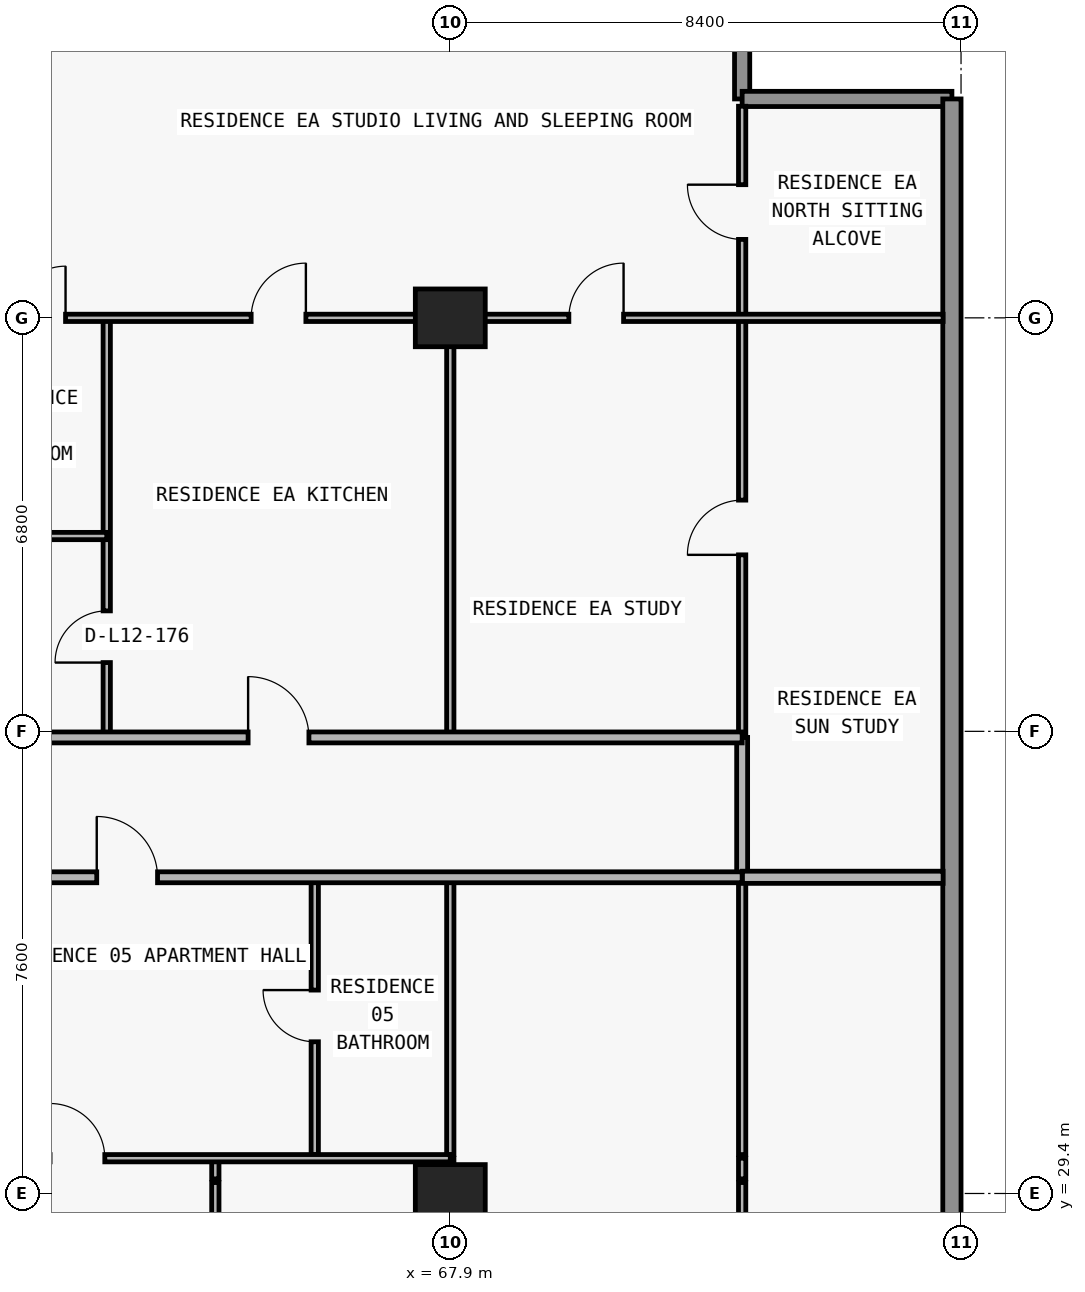
"""IFC4 building model, lengths in metres.
Left out: names, types, materials, properties, quantities, classifications, styles, units other than length and angle.
Written with IfcOpenShell. Run it as: python <this file> out.ifc"""

import sys

from ifc_helpers import new_model, si_unit, direction, frame, frame_2d, origin, origin_2d, place, context, subcontext, project, spatial, rectangle, extrude, element, fill, save


model = new_model("IFC4")
c1 = context("Model", 3, precision=1e-05, world=origin(), true_north=direction((0.0, 1.0)))
c2 = subcontext(c1, "Body", "Model", "MODEL_VIEW")
j1 = project(units=[si_unit("LENGTHUNIT", "METRE"), si_unit("PLANEANGLEUNIT", "RADIAN")], contexts=[c1])
p1 = place(None, origin())
s1 = spatial("IfcSite", under=j1, at=p1, CompositionType="ELEMENT")
p2 = place(p1, origin())
s2 = spatial("IfcBuilding", under=s1, at=p2, CompositionType="ELEMENT")
p3 = place(p2, frame((0.0, 0.0, 49.8)))
s3 = spatial("IfcBuildingStorey", under=s2, at=p3, CompositionType="ELEMENT", Elevation=49.8)
for number, where, z_axis, x_axis in (
    (1, (67.9, 29.4, 0.0), (0.0, 0.0, 1.0), (1.0, 0.0, 0.0)),
    (2, (67.9, 43.8, 0.0), (0.0, 0.0, 1.0), (1.0, 0.0, 0.0)),
):
    element("IfcColumn", number, at=place(p3, frame(where, z_axis=z_axis, x_axis=x_axis)), inside=s3, PredefinedType="COLUMN", context=c2, shape_type="SweptSolid", body=[
        extrude(rectangle(XDim=1.15, YDim=0.95, at=origin_2d()), origin(), (0.0, 0.0, 1.0), 3.05),
    ])
p4 = place(p3, frame((72.7, 50.45, 0.0), z_axis=(0.0, 0.0, 1.0), x_axis=(0.0, -1.0, 0.0)))
e3 = element("IfcWall", 3, at=p4, inside=s3, PredefinedType="ELEMENTEDWALL", context=c2, shape_type="SweptSolid", body=[
    extrude(rectangle(XDim=3.05, YDim=0.25, at=frame_2d((1.525, 0.0))), origin(), (0.0, 0.0, 1.0), 3.05),
])
p5 = place(p3, frame((72.7, 47.4, 0.0), z_axis=(0.0, 0.0, 1.0), x_axis=(1.0, 0.0, 0.0)))
e4 = element("IfcWall", 4, at=p5, inside=s3, PredefinedType="ELEMENTEDWALL", context=c2, shape_type="SweptSolid", body=[
    extrude(rectangle(XDim=3.45, YDim=0.25, at=frame_2d((1.725, 0.0))), origin(), (0.0, 0.0, 1.0), 3.05),
])
p6 = place(p3, frame((76.15, 47.4, 0.0), z_axis=(0.0, 0.0, 1.0), x_axis=(0.0, -1.0, 0.0)))
e5 = element("IfcWall", 5, at=p6, inside=s3, PredefinedType="STANDARD", context=c2, shape_type="SweptSolid", body=[
    extrude(rectangle(XDim=20.6, YDim=0.3, at=frame_2d((10.3, 0.0))), origin(), (0.0, 0.0, 1.0), 3.05),
])
p7 = place(p3, frame((62.25, 36.9, 0.0), z_axis=(0.0, 0.0, 1.0), x_axis=(0.0, 1.0, 0.0)))
e6 = element("IfcWall", 6, at=p7, inside=s3, PredefinedType="PARTITIONING", context=c2, shape_type="SweptSolid", body=[
    extrude(rectangle(XDim=6.9, YDim=0.12, at=frame_2d((3.45, 0.0))), origin(), (0.0, 0.0, 1.0), 2.486),
])
p8 = place(p7, frame((1.231, 0.0, 0.0)))
e7 = element("IfcOpeningElement", 7, at=p8, cuts=e6, PredefinedType="OPENING", context=c2, shape_type="SweptSolid", body=[
    extrude(rectangle(XDim=0.85, YDim=2.1, at=frame_2d((0.425, 1.05))), frame((0.0, 0.07, 0.0), z_axis=(0.0, -1.0, 0.0), x_axis=(1.0, 0.0, 0.0)), (0.0, 0.0, 1.0), 0.14),
])
p9 = place(p3, frame((64.036, 24.89, 0.0), z_axis=(0.0, 0.0, 1.0), x_axis=(0.0, 1.0, 0.0)))
e8 = element("IfcWall", 8, at=p9, inside=s3, PredefinedType="PARTITIONING", context=c2, shape_type="SweptSolid", body=[
    extrude(rectangle(XDim=4.69, YDim=0.12, at=frame_2d((2.345, 0.0))), origin(), (0.0, 0.0, 1.0), 3.05),
])
p10 = place(p9, frame((1.895, 0.0, 0.0)))
e9 = element("IfcOpeningElement", 9, at=p10, cuts=e8, PredefinedType="OPENING", context=c2, shape_type="SweptSolid", body=[
    extrude(rectangle(XDim=0.9, YDim=2.15, at=frame_2d((0.45, 1.075))), frame((0.0, 0.07, 0.0), z_axis=(0.0, -1.0, 0.0), x_axis=(1.0, 0.0, 0.0)), (0.0, 0.0, 1.0), 0.14),
])
p11 = place(p3, frame((64.036, 29.64, 0.0), z_axis=(0.0, 0.0, 1.0), x_axis=(0.0, 1.0, 0.0)))
e10 = element("IfcWall", 10, at=p11, inside=s3, PredefinedType="PARTITIONING", context=c2, shape_type="SweptSolid", body=[
    extrude(rectangle(XDim=0.34, YDim=0.12, at=frame_2d((0.17, 0.0))), origin(), (0.0, 0.0, 1.0), 3.05),
])
p12 = place(p3, frame((65.671, 30.04, 0.0), z_axis=(0.0, 0.0, 1.0), x_axis=(0.0, 1.0, 0.0)))
e11 = element("IfcWall", 11, at=p12, inside=s3, PredefinedType="PARTITIONING", context=c2, shape_type="SweptSolid", body=[
    extrude(rectangle(XDim=4.56, YDim=0.12, at=frame_2d((2.28, 0.0))), origin(), (0.0, 0.0, 1.0), 3.05),
])
p13 = place(p12, frame((1.855, 0.0, 0.0)))
e12 = element("IfcOpeningElement", 12, at=p13, cuts=e11, PredefinedType="OPENING", context=c2, shape_type="SweptSolid", body=[
    extrude(rectangle(XDim=0.85, YDim=2.1, at=frame_2d((0.425, 1.05))), frame((0.0, 0.07, 0.0), z_axis=(0.0, -1.0, 0.0), x_axis=(1.0, 0.0, 0.0)), (0.0, 0.0, 1.0), 0.14),
])
p14 = place(p3, frame((67.9, 24.89, 0.0), z_axis=(0.0, 0.0, 1.0), x_axis=(0.0, 1.0, 0.0)))
e13 = element("IfcWall", 13, at=p14, inside=s3, PredefinedType="PARTITIONING", context=c2, shape_type="SweptSolid", body=[
    extrude(rectangle(XDim=4.69, YDim=0.12, at=frame_2d((2.345, 0.0))), origin(), (0.0, 0.0, 1.0), 2.11),
])
p15 = place(p14, frame((1.895, 0.0, 0.0)))
e14 = element("IfcOpeningElement", 14, at=p15, cuts=e13, PredefinedType="OPENING", context=c2, shape_type="SweptSolid", body=[
    extrude(rectangle(XDim=0.9, YDim=2.06, at=frame_2d((0.45, 1.03))), frame((0.0, 0.07, 0.0), z_axis=(0.0, -1.0, 0.0), x_axis=(1.0, 0.0, 0.0)), (0.0, 0.0, 1.0), 0.14),
])
p16 = place(p3, frame((67.9, 29.64, 0.0), z_axis=(0.0, 0.0, 1.0), x_axis=(0.0, 1.0, 0.0)))
e15 = element("IfcWall", 15, at=p16, inside=s3, PredefinedType="PARTITIONING", context=c2, shape_type="SweptSolid", body=[
    extrude(rectangle(XDim=0.34, YDim=0.12, at=frame_2d((0.17, 0.0))), origin(), (0.0, 0.0, 1.0), 2.11),
])
p17 = place(p3, frame((67.9, 30.04, 0.0), z_axis=(0.0, 0.0, 1.0), x_axis=(0.0, 1.0, 0.0)))
e16 = element("IfcWall", 16, at=p17, inside=s3, PredefinedType="PARTITIONING", context=c2, shape_type="SweptSolid", body=[
    extrude(rectangle(XDim=4.56, YDim=0.12, at=frame_2d((2.28, 0.0))), origin(), (0.0, 0.0, 1.0), 2.11),
])
p18 = place(p3, frame((67.9, 36.9, 0.0), z_axis=(0.0, 0.0, 1.0), x_axis=(0.0, 1.0, 0.0)))
e17 = element("IfcWall", 17, at=p18, inside=s3, PredefinedType="PARTITIONING", context=c2, shape_type="SweptSolid", body=[
    extrude(rectangle(XDim=6.9, YDim=0.12, at=frame_2d((3.45, 0.0))), origin(), (0.0, 0.0, 1.0), 2.11),
])
p19 = place(p3, frame((72.7, 24.89, 0.0), z_axis=(0.0, 0.0, 1.0), x_axis=(0.0, 1.0, 0.0)))
e18 = element("IfcWall", 18, at=p19, inside=s3, PredefinedType="PARTITIONING", context=c2, shape_type="SweptSolid", body=[
    extrude(rectangle(XDim=4.69, YDim=0.12, at=frame_2d((2.345, 0.0))), origin(), (0.0, 0.0, 1.0), 3.05),
])
p20 = place(p3, frame((72.7, 29.64, 0.0), z_axis=(0.0, 0.0, 1.0), x_axis=(0.0, 1.0, 0.0)))
e19 = element("IfcWall", 19, at=p20, inside=s3, PredefinedType="PARTITIONING", context=c2, shape_type="SweptSolid", body=[
    extrude(rectangle(XDim=0.34, YDim=0.12, at=frame_2d((0.17, 0.0))), origin(), (0.0, 0.0, 1.0), 3.05),
])
p21 = place(p3, frame((72.7, 30.04, 0.0), z_axis=(0.0, 0.0, 1.0), x_axis=(0.0, 1.0, 0.0)))
e20 = element("IfcWall", 20, at=p21, inside=s3, PredefinedType="PARTITIONING", context=c2, shape_type="SweptSolid", body=[
    extrude(rectangle(XDim=4.56, YDim=0.12, at=frame_2d((2.28, 0.0))), origin(), (0.0, 0.0, 1.0), 3.05),
])
p22 = place(p3, frame((72.7, 34.605, 0.0), z_axis=(0.0, 0.0, 1.0), x_axis=(0.0, 1.0, 0.0)))
e21 = element("IfcWall", 21, at=p22, inside=s3, PredefinedType="PARTITIONING", context=c2, shape_type="SweptSolid", body=[
    extrude(rectangle(XDim=2.295, YDim=0.18, at=frame_2d((1.147, 0.0))), origin(), (0.0, 0.0, 1.0), 3.05),
])
p23 = place(p3, frame((72.7, 36.905, 0.0), z_axis=(0.0, 0.0, 1.0), x_axis=(0.0, 1.0, 0.0)))
e22 = element("IfcWall", 22, at=p23, inside=s3, PredefinedType="PARTITIONING", context=c2, shape_type="SweptSolid", body=[
    extrude(rectangle(XDim=10.375, YDim=0.12, at=frame_2d((5.188, 0.0))), origin(), (0.0, 0.0, 1.0), 3.05),
])
p24 = place(p23, frame((2.998, 0.0, 0.0)))
e23 = element("IfcOpeningElement", 23, at=p24, cuts=e22, PredefinedType="OPENING", context=c2, shape_type="SweptSolid", body=[
    extrude(rectangle(XDim=0.9, YDim=2.15, at=frame_2d((0.45, 1.075))), frame((0.0, 0.07, 0.0), z_axis=(0.0, -1.0, 0.0), x_axis=(1.0, 0.0, 0.0)), (0.0, 0.0, 1.0), 0.14),
])
p25 = place(p23, frame((8.185, 0.0, 0.0)))
e24 = element("IfcOpeningElement", 24, at=p25, cuts=e22, PredefinedType="OPENING", context=c2, shape_type="SweptSolid", body=[
    extrude(rectangle(XDim=0.9, YDim=2.15, at=frame_2d((0.45, 1.075))), frame((0.0, 0.07, 0.0), z_axis=(0.0, -1.0, 0.0), x_axis=(1.0, 0.0, 0.0)), (0.0, 0.0, 1.0), 0.14),
])
p26 = place(p3, frame((59.5, 29.98, 0.0), z_axis=(0.0, 0.0, 1.0), x_axis=(1.0, 0.0, 0.0)))
e25 = element("IfcWall", 25, at=p26, inside=s3, PredefinedType="PARTITIONING", context=c2, shape_type="SweptSolid", body=[
    extrude(rectangle(XDim=8.4, YDim=0.12, at=frame_2d((4.2, 0.0))), origin(), (0.0, 0.0, 1.0), 3.05),
])
p27 = place(p26, frame((1.818, 0.0, 0.0)))
e26 = element("IfcOpeningElement", 26, at=p27, cuts=e25, PredefinedType="OPENING", context=c2, shape_type="SweptSolid", body=[
    extrude(rectangle(XDim=0.9, YDim=2.15, at=frame_2d((0.45, 1.075))), frame((0.0, 0.07, 0.0), z_axis=(0.0, -1.0, 0.0), x_axis=(1.0, 0.0, 0.0)), (0.0, 0.0, 1.0), 0.14),
])
p28 = place(p3, frame((5.105, 34.6, 0.0), z_axis=(0.0, 0.0, 1.0), x_axis=(1.0, 0.0, 0.0)))
e27 = element("IfcWall", 27, at=p28, inside=s3, PredefinedType="PARTITIONING", context=c2, shape_type="SweptSolid", body=[
    extrude(rectangle(XDim=67.595, YDim=0.18, at=frame_2d((33.797, 0.0))), origin(), (0.0, 0.0, 1.0), 3.05),
])
p29 = place(p28, frame((7.365, 0.0, 0.0)))
e28 = element("IfcOpeningElement", 28, at=p29, cuts=e27, PredefinedType="OPENING", context=c2, shape_type="SweptSolid", body=[
    extrude(rectangle(XDim=1.0, YDim=2.2, at=frame_2d((0.5, 1.1))), frame((0.0, 0.1, 0.0), z_axis=(0.0, -1.0, 0.0), x_axis=(1.0, 0.0, 0.0)), (0.0, 0.0, 1.0), 0.2),
])
p30 = place(p28, frame((15.927, 0.0, 0.0)))
e29 = element("IfcOpeningElement", 29, at=p30, cuts=e27, PredefinedType="OPENING", context=c2, shape_type="SweptSolid", body=[
    extrude(rectangle(XDim=1.0, YDim=2.2, at=frame_2d((0.5, 1.1))), frame((0.0, 0.1, 0.0), z_axis=(0.0, -1.0, 0.0), x_axis=(1.0, 0.0, 0.0)), (0.0, 0.0, 1.0), 0.2),
])
p31 = place(p28, frame((24.407, 0.0, 0.0)))
e30 = element("IfcOpeningElement", 30, at=p31, cuts=e27, PredefinedType="OPENING", context=c2, shape_type="SweptSolid", body=[
    extrude(rectangle(XDim=1.0, YDim=2.2, at=frame_2d((0.5, 1.1))), frame((0.0, 0.1, 0.0), z_axis=(0.0, -1.0, 0.0), x_axis=(1.0, 0.0, 0.0)), (0.0, 0.0, 1.0), 0.2),
])
p32 = place(p28, frame((48.739, 0.0, 0.0)))
e31 = element("IfcOpeningElement", 31, at=p32, cuts=e27, PredefinedType="OPENING", context=c2, shape_type="SweptSolid", body=[
    extrude(rectangle(XDim=1.0, YDim=2.2, at=frame_2d((0.5, 1.1))), frame((0.0, 0.1, 0.0), z_axis=(0.0, -1.0, 0.0), x_axis=(1.0, 0.0, 0.0)), (0.0, 0.0, 1.0), 0.2),
])
p33 = place(p28, frame((56.98, 0.0, 0.0)))
e32 = element("IfcOpeningElement", 32, at=p33, cuts=e27, PredefinedType="OPENING", context=c2, shape_type="SweptSolid", body=[
    extrude(rectangle(XDim=1.0, YDim=2.2, at=frame_2d((0.5, 1.1))), frame((0.0, 0.1, 0.0), z_axis=(0.0, -1.0, 0.0), x_axis=(1.0, 0.0, 0.0)), (0.0, 0.0, 1.0), 0.2),
])
p34 = place(p3, frame((72.705, 34.6, 0.0), z_axis=(0.0, 0.0, 1.0), x_axis=(1.0, 0.0, 0.0)))
e33 = element("IfcWall", 33, at=p34, inside=s3, PredefinedType="PARTITIONING", context=c2, shape_type="SweptSolid", body=[
    extrude(rectangle(XDim=3.3, YDim=0.2, at=frame_2d((1.65, 0.0))), origin(), (0.0, 0.0, 1.0), 3.05),
])
p35 = place(p3, frame((60.055, 36.9, 0.0), z_axis=(0.0, 0.0, 1.0), x_axis=(1.0, 0.0, 0.0)))
e34 = element("IfcWall", 34, at=p35, inside=s3, PredefinedType="PARTITIONING", context=c2, shape_type="SweptSolid", body=[
    extrude(rectangle(XDim=12.645, YDim=0.18, at=frame_2d((6.323, 0.0))), origin(), (0.0, 0.0, 1.0), 3.05),
])
p36 = place(p35, frame((4.52, 0.0, 0.0)))
e35 = element("IfcOpeningElement", 35, at=p36, cuts=e34, PredefinedType="OPENING", context=c2, shape_type="SweptSolid", body=[
    extrude(rectangle(XDim=1.0, YDim=2.2, at=frame_2d((0.5, 1.1))), frame((0.0, 0.1, 0.0), z_axis=(0.0, -1.0, 0.0), x_axis=(1.0, 0.0, 0.0)), (0.0, 0.0, 1.0), 0.2),
])
p37 = place(p3, frame((60.045, 40.212, 0.0), z_axis=(0.0, 0.0, 1.0), x_axis=(1.0, 0.0, 0.0)))
e36 = element("IfcWall", 36, at=p37, inside=s3, PredefinedType="PARTITIONING", context=c2, shape_type="SweptSolid", body=[
    extrude(rectangle(XDim=2.205, YDim=0.12, at=frame_2d((1.103, 0.0))), origin(), (0.0, 0.0, 1.0), 3.05),
])
p38 = place(p3, frame((60.045, 43.8, 0.0), z_axis=(0.0, 0.0, 1.0), x_axis=(1.0, 0.0, 0.0)))
e37 = element("IfcWall", 37, at=p38, inside=s3, PredefinedType="PARTITIONING", context=c2, shape_type="SweptSolid", body=[
    extrude(rectangle(XDim=15.96, YDim=0.12, at=frame_2d((7.98, 0.0))), origin(), (0.0, 0.0, 1.0), 2.339),
])
p39 = place(p38, frame((9.805, 0.0, 0.0)))
e38 = element("IfcOpeningElement", 38, at=p39, cuts=e37, PredefinedType="OPENING", context=c2, shape_type="SweptSolid", body=[
    extrude(rectangle(XDim=0.9, YDim=2.15, at=frame_2d((0.45, 1.075))), frame((0.0, 0.07, 0.0), z_axis=(0.0, -1.0, 0.0), x_axis=(1.0, 0.0, 0.0)), (0.0, 0.0, 1.0), 0.14),
])
p40 = place(p38, frame((4.58, 0.0, 0.0)))
e39 = element("IfcOpeningElement", 39, at=p40, cuts=e37, PredefinedType="OPENING", context=c2, shape_type="SweptSolid", body=[
    extrude(rectangle(XDim=0.9, YDim=2.15, at=frame_2d((0.45, 1.075))), frame((0.0, 0.07, 0.0), z_axis=(0.0, -1.0, 0.0), x_axis=(1.0, 0.0, 0.0)), (0.0, 0.0, 1.0), 0.14),
])
p41 = place(p38, frame((0.677, 0.0, 0.0)))
e40 = element("IfcOpeningElement", 40, at=p41, cuts=e37, PredefinedType="OPENING", context=c2, shape_type="SweptSolid", body=[
    extrude(rectangle(XDim=0.85, YDim=2.1, at=frame_2d((0.425, 1.05))), frame((0.0, 0.07, 0.0), z_axis=(0.0, -1.0, 0.0), x_axis=(1.0, 0.0, 0.0)), (0.0, 0.0, 1.0), 0.14),
])
p42 = place(p33, origin())
e41 = element("IfcDoor", 41, at=p42, inside=s3, OperationType="SINGLE_SWING_LEFT", PredefinedType="DOOR", context=c2, shape_type="SweptSolid", body=[
    extrude(rectangle(XDim=1.0, YDim=2.2, at=frame_2d((0.5, 1.1))), frame((0.0, 0.025, 0.0), z_axis=(0.0, -1.0, 0.0), x_axis=(1.0, 0.0, 0.0)), (0.0, 0.0, 1.0), 0.05),
])
fill(e32, e41)
p43 = place(p13, origin())
e42 = element("IfcDoor", 42, at=p43, inside=s3, OperationType="SINGLE_SWING_RIGHT", PredefinedType="DOOR", context=c2, shape_type="SweptSolid", body=[
    extrude(rectangle(XDim=0.85, YDim=2.1, at=frame_2d((0.425, 1.05))), frame((0.0, 0.025, 0.0), z_axis=(0.0, -1.0, 0.0), x_axis=(1.0, 0.0, 0.0)), (0.0, 0.0, 1.0), 0.05),
])
fill(e12, e42)
p44 = place(p27, origin())
e43 = element("IfcDoor", 43, at=p44, inside=s3, OperationType="SINGLE_SWING_LEFT", PredefinedType="DOOR", context=c2, shape_type="SweptSolid", body=[
    extrude(rectangle(XDim=0.9, YDim=2.15, at=frame_2d((0.45, 1.075))), frame((0.0, 0.025, 0.0), z_axis=(0.0, -1.0, 0.0), x_axis=(1.0, 0.0, 0.0)), (0.0, 0.0, 1.0), 0.05),
])
fill(e26, e43)
p45 = place(p39, origin())
e44 = element("IfcDoor", 44, at=p45, inside=s3, OperationType="SINGLE_SWING_RIGHT", PredefinedType="DOOR", context=c2, shape_type="SweptSolid", body=[
    extrude(rectangle(XDim=0.9, YDim=2.15, at=frame_2d((0.45, 1.075))), frame((0.0, 0.025, 0.0), z_axis=(0.0, -1.0, 0.0), x_axis=(1.0, 0.0, 0.0)), (0.0, 0.0, 1.0), 0.05),
])
fill(e38, e44)
p46 = place(p36, origin())
e45 = element("IfcDoor", 45, at=p46, inside=s3, OperationType="SINGLE_SWING_LEFT", PredefinedType="DOOR", context=c2, shape_type="SweptSolid", body=[
    extrude(rectangle(XDim=1.0, YDim=2.2, at=frame_2d((0.5, 1.1))), frame((0.0, 0.025, 0.0), z_axis=(0.0, -1.0, 0.0), x_axis=(1.0, 0.0, 0.0)), (0.0, 0.0, 1.0), 0.05),
])
fill(e35, e45)
p47 = place(p40, origin())
e46 = element("IfcDoor", 46, at=p47, inside=s3, OperationType="SINGLE_SWING_RIGHT", PredefinedType="DOOR", context=c2, shape_type="SweptSolid", body=[
    extrude(rectangle(XDim=0.9, YDim=2.15, at=frame_2d((0.45, 1.075))), frame((0.0, 0.025, 0.0), z_axis=(0.0, -1.0, 0.0), x_axis=(1.0, 0.0, 0.0)), (0.0, 0.0, 1.0), 0.05),
])
fill(e39, e46)
p48 = place(p8, origin())
e47 = element("IfcDoor", 47, at=p48, inside=s3, OperationType="SINGLE_SWING_LEFT", PredefinedType="DOOR", context=c2, shape_type="SweptSolid", body=[
    extrude(rectangle(XDim=0.85, YDim=2.1, at=frame_2d((0.425, 1.05))), frame((0.0, 0.025, 0.0), z_axis=(0.0, -1.0, 0.0), x_axis=(1.0, 0.0, 0.0)), (0.0, 0.0, 1.0), 0.05),
])
fill(e7, e47)
p49 = place(p41, origin())
e48 = element("IfcDoor", 48, at=p49, inside=s3, OperationType="SINGLE_SWING_RIGHT", PredefinedType="DOOR", context=c2, shape_type="SweptSolid", body=[
    extrude(rectangle(XDim=0.85, YDim=2.1, at=frame_2d((0.425, 1.05))), frame((0.0, 0.025, 0.0), z_axis=(0.0, -1.0, 0.0), x_axis=(1.0, 0.0, 0.0)), (0.0, 0.0, 1.0), 0.05),
])
fill(e40, e48)
p50 = place(p24, origin())
e49 = element("IfcDoor", 49, at=p50, inside=s3, OperationType="SINGLE_SWING_LEFT", PredefinedType="DOOR", context=c2, shape_type="SweptSolid", body=[
    extrude(rectangle(XDim=0.9, YDim=2.15, at=frame_2d((0.45, 1.075))), frame((0.0, 0.025, 0.0), z_axis=(0.0, -1.0, 0.0), x_axis=(1.0, 0.0, 0.0)), (0.0, 0.0, 1.0), 0.05),
])
fill(e23, e49)
p51 = place(p25, origin())
e50 = element("IfcDoor", 50, at=p51, inside=s3, OperationType="SINGLE_SWING_RIGHT", PredefinedType="DOOR", context=c2, shape_type="SweptSolid", body=[
    extrude(rectangle(XDim=0.9, YDim=2.15, at=frame_2d((0.45, 1.075))), frame((0.0, 0.025, 0.0), z_axis=(0.0, -1.0, 0.0), x_axis=(1.0, 0.0, 0.0)), (0.0, 0.0, 1.0), 0.05),
])
fill(e24, e50)
save(model, sys.argv[1])
